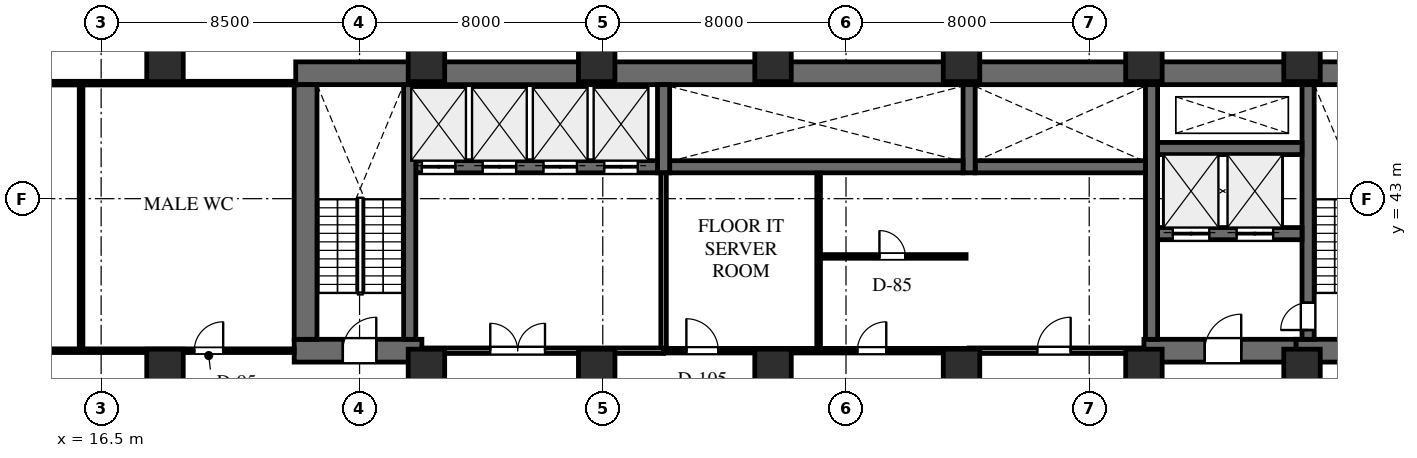
"""IFC4 building model, lengths in metres.
Left out: names, types, materials, properties, quantities, classifications, styles, units other than length and angle.
Written with IfcOpenShell. Run it as: python <this file> out.ifc"""

import sys

from ifc_helpers import new_model, si_unit, direction, frame, frame_2d, origin, origin_2d, place, context, subcontext, project, spatial, rectangle, extrude, element, fill, save


model = new_model("IFC4")
c1 = context("Model", 3, precision=1e-05, world=origin(), true_north=direction((0.0, 1.0)))
c2 = subcontext(c1, "Body", "Model", "MODEL_VIEW")
j1 = project(units=[si_unit("LENGTHUNIT", "METRE"), si_unit("PLANEANGLEUNIT", "RADIAN")], contexts=[c1])
p1 = place(None, origin())
s1 = spatial("IfcSite", under=j1, at=p1, CompositionType="ELEMENT")
p2 = place(p1, origin())
s2 = spatial("IfcBuilding", under=s1, at=p2, CompositionType="ELEMENT")
p3 = place(p2, frame((0.0, 0.0, 53.5)))
s3 = spatial("IfcBuildingStorey", under=s2, at=p3, CompositionType="ELEMENT", Elevation=53.5)
p4 = place(p3, frame((22.9, 47.125, 0.0), z_axis=(0.0, 0.0, 1.0), x_axis=(1.0, 0.0, 0.0)))
e1 = element("IfcWall", 1, at=p4, inside=s3, PredefinedType="SHEAR", context=c2, shape_type="SweptSolid", body=[
    extrude(rectangle(XDim=43.7, YDim=0.75, at=frame_2d((21.85, 0.0))), origin(), (0.0, 0.0, 1.0), 4.0),
])
p5 = place(p3, frame((55.8, 38.0, 0.0), z_axis=(0.0, 0.0, 1.0), x_axis=(1.0, 0.0, 0.0)))
e2 = element("IfcWall", 2, at=p5, inside=s3, PredefinedType="SHEAR", context=c2, shape_type="SweptSolid", body=[
    extrude(rectangle(XDim=10.8, YDim=0.75, at=frame_2d((5.4, 0.0))), origin(), (0.0, 0.0, 1.0), 4.0),
])
p6 = place(p5, frame((1.5, 0.0, 0.0)))
e3 = element("IfcOpeningElement", 3, at=p6, cuts=e2, PredefinedType="OPENING", context=c2, shape_type="SweptSolid", body=[
    extrude(rectangle(XDim=1.1, YDim=2.2, at=frame_2d((0.55, 1.1))), frame((0.0, 0.385, 0.0), z_axis=(0.0, -1.0, 0.0), x_axis=(1.0, 0.0, 0.0)), (0.0, 0.0, 1.0), 0.77),
])
p7 = place(p5, frame((4.82, 0.0, 0.0)))
e4 = element("IfcOpeningElement", 4, at=p7, cuts=e2, PredefinedType="OPENING", context=c2, shape_type="SweptSolid", body=[
    extrude(rectangle(XDim=1.0, YDim=2.15, at=frame_2d((0.5, 1.075))), frame((0.0, 0.385, 0.0), z_axis=(0.0, -1.0, 0.0), x_axis=(1.0, 0.0, 0.0)), (0.0, 0.0, 1.0), 0.77),
])
p8 = place(p5, frame((8.05, 0.0, 0.0)))
e5 = element("IfcOpeningElement", 5, at=p8, cuts=e2, PredefinedType="OPENING", context=c2, shape_type="SweptSolid", body=[
    extrude(rectangle(XDim=1.1, YDim=2.2, at=frame_2d((0.55, 1.1))), frame((0.0, 0.385, 0.0), z_axis=(0.0, -1.0, 0.0), x_axis=(1.0, 0.0, 0.0)), (0.0, 0.0, 1.0), 0.77),
])
p9 = place(p3, frame((56.2, 38.375, 0.0), z_axis=(0.0, 0.0, 1.0), x_axis=(0.0, 1.0, 0.0)))
e6 = element("IfcWall", 6, at=p9, inside=s3, PredefinedType="SHEAR", context=c2, shape_type="SweptSolid", body=[
    extrude(rectangle(XDim=8.375, YDim=0.4, at=frame_2d((4.188, 0.0))), origin(), (0.0, 0.0, 1.0), 4.0),
])
p10 = place(p9, frame((0.305, 0.0, 0.0)))
e7 = element("IfcOpeningElement", 7, at=p10, cuts=e6, PredefinedType="OPENING", context=c2, shape_type="SweptSolid", body=[
    extrude(rectangle(XDim=0.9, YDim=2.15, at=frame_2d((0.45, 1.075))), frame((0.0, 0.21, 0.0), z_axis=(0.0, -1.0, 0.0), x_axis=(1.0, 0.0, 0.0)), (0.0, 0.0, 1.0), 0.42),
])
p11 = place(p3, frame((50.8, 38.0, 0.0), z_axis=(0.0, 0.0, 1.0), x_axis=(1.0, 0.0, 0.0)))
e8 = element("IfcWall", 8, at=p11, inside=s3, PredefinedType="SHEAR", context=c2, shape_type="SweptSolid", body=[
    extrude(rectangle(XDim=5.0, YDim=0.75, at=frame_2d((2.5, 0.0))), origin(), (0.0, 0.0, 1.0), 4.0),
])
p12 = place(p11, frame((2.0, 0.0, 0.0)))
e9 = element("IfcOpeningElement", 9, at=p12, cuts=e8, PredefinedType="OPENING", context=c2, shape_type="SweptSolid", body=[
    extrude(rectangle(XDim=1.2, YDim=2.2, at=frame_2d((0.6, 1.1))), frame((0.0, 0.385, 0.0), z_axis=(0.0, -1.0, 0.0), x_axis=(1.0, 0.0, 0.0)), (0.0, 0.0, 1.0), 0.77),
])
p13 = place(p3, frame((51.25, 41.85, 0.0), z_axis=(0.0, 0.0, 1.0), x_axis=(1.0, 0.0, 0.0)))
e10 = element("IfcWall", 10, at=p13, inside=s3, PredefinedType="SHEAR", context=c2, shape_type="SweptSolid", body=[
    extrude(rectangle(XDim=4.75, YDim=0.4, at=frame_2d((2.375, 0.0))), origin(), (0.0, 0.0, 1.0), 4.0),
])
p14 = place(p13, frame((0.5, 0.0, 0.0)))
e11 = element("IfcOpeningElement", 11, at=p14, cuts=e10, PredefinedType="OPENING", context=c2, shape_type="SweptSolid", body=[
    extrude(rectangle(XDim=1.2, YDim=2.2, at=frame_2d((0.6, 1.1))), frame((0.0, 0.21, 0.0), z_axis=(0.0, -1.0, 0.0), x_axis=(1.0, 0.0, 0.0)), (0.0, 0.0, 1.0), 0.42),
])
p15 = place(p13, frame((2.6, 0.0, 0.0)))
e12 = element("IfcOpeningElement", 12, at=p15, cuts=e10, PredefinedType="OPENING", context=c2, shape_type="SweptSolid", body=[
    extrude(rectangle(XDim=1.2, YDim=2.2, at=frame_2d((0.6, 1.1))), frame((0.0, 0.21, 0.0), z_axis=(0.0, -1.0, 0.0), x_axis=(1.0, 0.0, 0.0)), (0.0, 0.0, 1.0), 0.42),
])
p16 = place(p3, frame((51.25, 44.65, 0.0), z_axis=(0.0, 0.0, 1.0), x_axis=(1.0, 0.0, 0.0)))
e13 = element("IfcWall", 13, at=p16, inside=s3, PredefinedType="SHEAR", context=c2, shape_type="SweptSolid", body=[
    extrude(rectangle(XDim=4.75, YDim=0.4, at=frame_2d((2.375, 0.0))), origin(), (0.0, 0.0, 1.0), 4.0),
])
p17 = place(p3, frame((51.05, 38.375, 0.0), z_axis=(0.0, 0.0, 1.0), x_axis=(0.0, 1.0, 0.0)))
e14 = element("IfcWall", 14, at=p17, inside=s3, PredefinedType="SHEAR", context=c2, shape_type="SweptSolid", body=[
    extrude(rectangle(XDim=8.375, YDim=0.4, at=frame_2d((4.188, 0.0))), origin(), (0.0, 0.0, 1.0), 4.0),
])
p18 = place(p3, frame((45.25, 44.05, 0.0), z_axis=(0.0, 0.0, 1.0), x_axis=(1.0, 0.0, 0.0)))
e15 = element("IfcWall", 15, at=p18, inside=s3, PredefinedType="SHEAR", context=c2, shape_type="SweptSolid", body=[
    extrude(rectangle(XDim=5.6, YDim=0.4, at=frame_2d((2.8, 0.0))), origin(), (0.0, 0.0, 1.0), 4.0),
])
p19 = place(p3, frame((45.05, 43.85, 0.0), z_axis=(0.0, 0.0, 1.0), x_axis=(0.0, 1.0, 0.0)))
e16 = element("IfcWall", 16, at=p19, inside=s3, PredefinedType="SHEAR", context=c2, shape_type="SweptSolid", body=[
    extrude(rectangle(XDim=2.9, YDim=0.4, at=frame_2d((1.45, 0.0))), origin(), (0.0, 0.0, 1.0), 4.0),
])
p20 = place(p3, frame((35.2, 44.05, 0.0), z_axis=(0.0, 0.0, 1.0), x_axis=(1.0, 0.0, 0.0)))
e17 = element("IfcWall", 17, at=p20, inside=s3, PredefinedType="SHEAR", context=c2, shape_type="SweptSolid", body=[
    extrude(rectangle(XDim=9.65, YDim=0.4, at=frame_2d((4.825, 0.0))), origin(), (0.0, 0.0, 1.0), 4.0),
])
p21 = place(p3, frame((35.0, 43.85, 0.0), z_axis=(0.0, 0.0, 1.0), x_axis=(0.0, 1.0, 0.0)))
e18 = element("IfcWall", 18, at=p21, inside=s3, PredefinedType="SHEAR", context=c2, shape_type="SweptSolid", body=[
    extrude(rectangle(XDim=2.9, YDim=0.4, at=frame_2d((1.45, 0.0))), origin(), (0.0, 0.0, 1.0), 4.0),
])
p22 = place(p3, frame((26.85, 44.05, 0.0), z_axis=(0.0, 0.0, 1.0), x_axis=(1.0, 0.0, 0.0)))
e19 = element("IfcWall", 19, at=p22, inside=s3, PredefinedType="SHEAR", context=c2, shape_type="SweptSolid", body=[
    extrude(rectangle(XDim=7.95, YDim=0.4, at=frame_2d((3.975, 0.0))), origin(), (0.0, 0.0, 1.0), 4.0),
])
p23 = place(p22, frame((0.2, 0.0, 0.0)))
e20 = element("IfcOpeningElement", 20, at=p23, cuts=e19, PredefinedType="OPENING", context=c2, shape_type="SweptSolid", body=[
    extrude(rectangle(XDim=1.1, YDim=2.2, at=frame_2d((0.55, 1.1))), frame((0.0, 0.21, 0.0), z_axis=(0.0, -1.0, 0.0), x_axis=(1.0, 0.0, 0.0)), (0.0, 0.0, 1.0), 0.42),
])
p24 = place(p22, frame((2.2, 0.0, 0.0)))
e21 = element("IfcOpeningElement", 21, at=p24, cuts=e19, PredefinedType="OPENING", context=c2, shape_type="SweptSolid", body=[
    extrude(rectangle(XDim=1.1, YDim=2.2, at=frame_2d((0.55, 1.1))), frame((0.0, 0.21, 0.0), z_axis=(0.0, -1.0, 0.0), x_axis=(1.0, 0.0, 0.0)), (0.0, 0.0, 1.0), 0.42),
])
p25 = place(p22, frame((4.2, 0.0, 0.0)))
e22 = element("IfcOpeningElement", 22, at=p25, cuts=e19, PredefinedType="OPENING", context=c2, shape_type="SweptSolid", body=[
    extrude(rectangle(XDim=1.1, YDim=2.2, at=frame_2d((0.55, 1.1))), frame((0.0, 0.21, 0.0), z_axis=(0.0, -1.0, 0.0), x_axis=(1.0, 0.0, 0.0)), (0.0, 0.0, 1.0), 0.42),
])
p26 = place(p22, frame((6.2, 0.0, 0.0)))
e23 = element("IfcOpeningElement", 23, at=p26, cuts=e19, PredefinedType="OPENING", context=c2, shape_type="SweptSolid", body=[
    extrude(rectangle(XDim=1.1, YDim=2.2, at=frame_2d((0.55, 1.1))), frame((0.0, 0.21, 0.0), z_axis=(0.0, -1.0, 0.0), x_axis=(1.0, 0.0, 0.0)), (0.0, 0.0, 1.0), 0.42),
])
p27 = place(p3, frame((22.85, 38.0, 0.0), z_axis=(0.0, 0.0, 1.0), x_axis=(1.0, 0.0, 0.0)))
e24 = element("IfcWall", 24, at=p27, inside=s3, PredefinedType="SHEAR", context=c2, shape_type="SweptSolid", body=[
    extrude(rectangle(XDim=4.2, YDim=0.75, at=frame_2d((2.1, 0.0))), origin(), (0.0, 0.0, 1.0), 4.0),
])
p28 = place(p27, frame((1.6, 0.0, 0.0)))
e25 = element("IfcOpeningElement", 25, at=p28, cuts=e24, PredefinedType="OPENING", context=c2, shape_type="SweptSolid", body=[
    extrude(rectangle(XDim=1.1, YDim=2.2, at=frame_2d((0.55, 1.1))), frame((0.0, 0.385, 0.0), z_axis=(0.0, -1.0, 0.0), x_axis=(1.0, 0.0, 0.0)), (0.0, 0.0, 1.0), 0.77),
])
p29 = place(p3, frame((23.225, 38.375, 0.0), z_axis=(0.0, 0.0, 1.0), x_axis=(0.0, 1.0, 0.0)))
e26 = element("IfcWall", 26, at=p29, inside=s3, PredefinedType="SHEAR", context=c2, shape_type="SweptSolid", body=[
    extrude(rectangle(XDim=8.375, YDim=0.75, at=frame_2d((4.188, 0.0))), origin(), (0.0, 0.0, 1.0), 4.0),
])
p30 = place(p3, frame((26.65, 38.375, 0.0), z_axis=(0.0, 0.0, 1.0), x_axis=(0.0, 1.0, 0.0)))
e27 = element("IfcWall", 27, at=p30, inside=s3, PredefinedType="SHEAR", context=c2, shape_type="SweptSolid", body=[
    extrude(rectangle(XDim=8.375, YDim=0.4, at=frame_2d((4.188, 0.0))), origin(), (0.0, 0.0, 1.0), 4.0),
])
for number, where, z_axis, x_axis in (
    (28, (56.0, 47.55, 0.0), (0.0, 0.0, 1.0), (1.0, 0.0, 0.0)),
    (29, (56.0, 37.35, 0.0), (0.0, 0.0, 1.0), (1.0, 0.0, 0.0)),
    (30, (50.8, 47.55, 0.0), (0.0, 0.0, 1.0), (1.0, 0.0, 0.0)),
    (31, (50.8, 37.35, 0.0), (0.0, 0.0, 1.0), (1.0, 0.0, 0.0)),
    (32, (44.8, 37.35, 0.0), (0.0, 0.0, 1.0), (1.0, 0.0, 0.0)),
    (33, (44.8, 47.55, 0.0), (0.0, 0.0, 1.0), (1.0, 0.0, 0.0)),
    (34, (38.6, 37.35, 0.0), (0.0, 0.0, 1.0), (1.0, 0.0, 0.0)),
    (35, (38.6, 47.55, 0.0), (0.0, 0.0, 1.0), (1.0, 0.0, 0.0)),
    (36, (32.8, 37.35, 0.0), (0.0, 0.0, 1.0), (1.0, 0.0, 0.0)),
    (37, (32.8, 47.55, 0.0), (0.0, 0.0, 1.0), (1.0, 0.0, 0.0)),
    (38, (27.2, 37.35, 0.0), (0.0, 0.0, 1.0), (1.0, 0.0, 0.0)),
    (39, (27.2, 47.55, 0.0), (0.0, 0.0, 1.0), (1.0, 0.0, 0.0)),
    (40, (18.6, 37.35, 0.0), (0.0, 0.0, 1.0), (1.0, 0.0, 0.0)),
    (41, (18.6, 47.55, 0.0), (0.0, 0.0, 1.0), (1.0, 0.0, 0.0)),
):
    element("IfcColumn", number, at=place(p3, frame(where, z_axis=z_axis, x_axis=x_axis)), inside=s3, PredefinedType="COLUMN", context=c2, shape_type="SweptSolid", body=[
        extrude(rectangle(XDim=1.2, YDim=1.4, at=origin_2d()), origin(), (0.0, 0.0, 1.0), 4.0),
    ])
p31 = place(p3, frame((45.05, 38.0, 0.0), z_axis=(0.0, 0.0, 1.0), x_axis=(1.0, 0.0, 0.0)))
e42 = element("IfcWall", 42, at=p31, inside=s3, PredefinedType="STANDARD", context=c2, shape_type="SweptSolid", body=[
    extrude(rectangle(XDim=5.75, YDim=0.18, at=frame_2d((2.875, 0.0))), origin(), (0.0, 0.0, 1.0), 2.813),
])
p32 = place(p31, frame((2.24, 0.0, 0.0)))
e43 = element("IfcOpeningElement", 43, at=p32, cuts=e42, PredefinedType="OPENING", context=c2, shape_type="SweptSolid", body=[
    extrude(rectangle(XDim=1.1, YDim=2.2, at=frame_2d((0.55, 1.1))), frame((0.0, 0.1, 0.0), z_axis=(0.0, -1.0, 0.0), x_axis=(1.0, 0.0, 0.0)), (0.0, 0.0, 1.0), 0.2),
])
p33 = place(p3, frame((35.0, 38.0, 0.0), z_axis=(0.0, 0.0, 1.0), x_axis=(0.0, 1.0, 0.0)))
e44 = element("IfcWall", 44, at=p33, inside=s3, PredefinedType="STANDARD", context=c2, shape_type="SweptSolid", body=[
    extrude(rectangle(XDim=5.85, YDim=0.18, at=frame_2d((2.925, 0.0))), origin(), (0.0, 0.0, 1.0), 3.74),
])
p34 = place(p3, frame((27.05, 38.0, 0.0), z_axis=(0.0, 0.0, 1.0), x_axis=(1.0, 0.0, 0.0)))
e45 = element("IfcWall", 45, at=p34, inside=s3, PredefinedType="STANDARD", context=c2, shape_type="SweptSolid", body=[
    extrude(rectangle(XDim=7.95, YDim=0.18, at=frame_2d((3.975, 0.0))), origin(), (0.0, 0.0, 1.0), 2.813),
])
p35 = place(p34, frame((2.25, 0.0, 0.0)))
e46 = element("IfcOpeningElement", 46, at=p35, cuts=e45, PredefinedType="OPENING", context=c2, shape_type="SweptSolid", body=[
    extrude(rectangle(XDim=1.8, YDim=2.2, at=frame_2d((0.9, 1.1))), frame((0.0, 0.1, 0.0), z_axis=(0.0, -1.0, 0.0), x_axis=(1.0, 0.0, 0.0)), (0.0, 0.0, 1.0), 0.2),
])
p36 = place(p3, frame((35.0, 38.0, 0.0), z_axis=(0.0, 0.0, 1.0), x_axis=(1.0, 0.0, 0.0)))
e47 = element("IfcWall", 47, at=p36, inside=s3, PredefinedType="PARTITIONING", context=c2, shape_type="SweptSolid", body=[
    extrude(rectangle(XDim=10.05, YDim=0.15, at=frame_2d((5.025, 0.0))), origin(), (0.0, 0.0, 1.0), 2.813),
])
p37 = place(p36, frame((0.75, 0.0, 0.0)))
e48 = element("IfcOpeningElement", 48, at=p37, cuts=e47, PredefinedType="OPENING", context=c2, shape_type="SweptSolid", body=[
    extrude(rectangle(XDim=1.05, YDim=2.2, at=frame_2d((0.525, 1.1))), frame((0.0, 0.085, 0.0), z_axis=(0.0, -1.0, 0.0), x_axis=(1.0, 0.0, 0.0)), (0.0, 0.0, 1.0), 0.17),
])
p38 = place(p36, frame((6.375, 0.0, 0.0)))
e49 = element("IfcOpeningElement", 49, at=p38, cuts=e47, PredefinedType="OPENING", context=c2, shape_type="SweptSolid", body=[
    extrude(rectangle(XDim=0.95, YDim=2.15, at=frame_2d((0.475, 1.075))), frame((0.0, 0.085, 0.0), z_axis=(0.0, -1.0, 0.0), x_axis=(1.0, 0.0, 0.0)), (0.0, 0.0, 1.0), 0.17),
])
p39 = place(p3, frame((40.1, 38.068, 0.0), z_axis=(0.0, 0.0, 1.0), x_axis=(0.0, 1.0, 0.0)))
e50 = element("IfcWall", 50, at=p39, inside=s3, PredefinedType="PARTITIONING", context=c2, shape_type="SweptSolid", body=[
    extrude(rectangle(XDim=5.774, YDim=0.12, at=frame_2d((2.887, 0.0))), origin(), (0.0, 0.0, 1.0), 3.74),
])
p40 = place(p3, frame((40.168, 41.1, 0.0), z_axis=(0.0, 0.0, 1.0), x_axis=(1.0, 0.0, 0.0)))
e51 = element("IfcWall", 51, at=p40, inside=s3, PredefinedType="PARTITIONING", context=c2, shape_type="SweptSolid", body=[
    extrude(rectangle(XDim=4.782, YDim=0.12, at=frame_2d((2.391, 0.0))), origin(), (0.0, 0.0, 1.0), 2.813),
])
p41 = place(p40, frame((1.932, 0.0, 0.0)))
e52 = element("IfcOpeningElement", 52, at=p41, cuts=e51, PredefinedType="OPENING", context=c2, shape_type="SweptSolid", body=[
    extrude(rectangle(XDim=0.85, YDim=2.1, at=frame_2d((0.425, 1.05))), frame((0.0, 0.07, 0.0), z_axis=(0.0, -1.0, 0.0), x_axis=(1.0, 0.0, 0.0)), (0.0, 0.0, 1.0), 0.14),
])
p42 = place(p3, frame((6.22, 38.0, 0.0), z_axis=(0.0, 0.0, 1.0), x_axis=(1.0, 0.0, 0.0)))
e53 = element("IfcWall", 53, at=p42, inside=s3, PredefinedType="PARTITIONING", context=c2, shape_type="SweptSolid", body=[
    extrude(rectangle(XDim=16.63, YDim=0.12, at=frame_2d((8.315, 0.0))), origin(), (0.0, 0.0, 1.0), 2.813),
])
p43 = place(p42, frame((0.424, 0.0, 0.0)))
e54 = element("IfcOpeningElement", 54, at=p43, cuts=e53, PredefinedType="OPENING", context=c2, shape_type="SweptSolid", body=[
    extrude(rectangle(XDim=0.95, YDim=2.15, at=frame_2d((0.475, 1.075))), frame((0.0, 0.07, 0.0), z_axis=(0.0, -1.0, 0.0), x_axis=(1.0, 0.0, 0.0)), (0.0, 0.0, 1.0), 0.14),
])
p44 = place(p42, frame((5.444, 0.0, 0.0)))
e55 = element("IfcOpeningElement", 55, at=p44, cuts=e53, PredefinedType="OPENING", context=c2, shape_type="SweptSolid", body=[
    extrude(rectangle(XDim=0.95, YDim=2.15, at=frame_2d((0.475, 1.075))), frame((0.0, 0.07, 0.0), z_axis=(0.0, -1.0, 0.0), x_axis=(1.0, 0.0, 0.0)), (0.0, 0.0, 1.0), 0.14),
])
p45 = place(p42, frame((13.344, 0.0, 0.0)))
e56 = element("IfcOpeningElement", 56, at=p45, cuts=e53, PredefinedType="OPENING", context=c2, shape_type="SweptSolid", body=[
    extrude(rectangle(XDim=0.95, YDim=2.15, at=frame_2d((0.475, 1.075))), frame((0.0, 0.07, 0.0), z_axis=(0.0, -1.0, 0.0), x_axis=(1.0, 0.0, 0.0)), (0.0, 0.0, 1.0), 0.14),
])
p46 = place(p3, frame((6.22, 46.8, 0.0), z_axis=(0.0, 0.0, 1.0), x_axis=(1.0, 0.0, 0.0)))
e57 = element("IfcWall", 57, at=p46, inside=s3, PredefinedType="PARTITIONING", context=c2, shape_type="SweptSolid", body=[
    extrude(rectangle(XDim=16.68, YDim=0.12, at=frame_2d((8.34, 0.0))), origin(), (0.0, 0.0, 1.0), 2.813),
])
p47 = place(p3, frame((15.84, 38.068, 0.0), z_axis=(0.0, 0.0, 1.0), x_axis=(0.0, 1.0, 0.0)))
e58 = element("IfcWall", 58, at=p47, inside=s3, PredefinedType="PARTITIONING", context=c2, shape_type="SweptSolid", body=[
    extrude(rectangle(XDim=8.664, YDim=0.12, at=frame_2d((4.332, 0.0))), origin(), (0.0, 0.0, 1.0), 3.74),
])
p48 = place(p12, origin())
e59 = element("IfcDoor", 59, at=p48, inside=s3, OperationType="SINGLE_SWING_RIGHT", PredefinedType="DOOR", context=c2, shape_type="SweptSolid", body=[
    extrude(rectangle(XDim=1.2, YDim=2.2, at=frame_2d((0.6, 1.1))), frame((0.0, 0.025, 0.0), z_axis=(0.0, -1.0, 0.0), x_axis=(1.0, 0.0, 0.0)), (0.0, 0.0, 1.0), 0.05),
])
fill(e9, e59)
p49 = place(p10, origin())
e60 = element("IfcDoor", 60, at=p49, inside=s3, OperationType="SINGLE_SWING_LEFT", PredefinedType="DOOR", context=c2, shape_type="SweptSolid", body=[
    extrude(rectangle(XDim=0.9, YDim=2.15, at=frame_2d((0.45, 1.075))), frame((0.0, 0.025, 0.0), z_axis=(0.0, -1.0, 0.0), x_axis=(1.0, 0.0, 0.0)), (0.0, 0.0, 1.0), 0.05),
])
fill(e7, e60)
p50 = place(p28, origin())
e61 = element("IfcDoor", 61, at=p50, inside=s3, OperationType="SINGLE_SWING_RIGHT", PredefinedType="DOOR", context=c2, shape_type="SweptSolid", body=[
    extrude(rectangle(XDim=1.1, YDim=2.2, at=frame_2d((0.55, 1.1))), frame((0.0, 0.025, 0.0), z_axis=(0.0, -1.0, 0.0), x_axis=(1.0, 0.0, 0.0)), (0.0, 0.0, 1.0), 0.05),
])
fill(e25, e61)
p51 = place(p23, origin())
e62 = element("IfcDoor", 62, at=p51, inside=s3, OperationType="DOUBLE_DOOR_SLIDING", PredefinedType="DOOR", context=c2, shape_type="SweptSolid", body=[
    extrude(rectangle(XDim=1.1, YDim=2.2, at=frame_2d((0.55, 1.1))), frame((0.0, 0.025, 0.0), z_axis=(0.0, -1.0, 0.0), x_axis=(1.0, 0.0, 0.0)), (0.0, 0.0, 1.0), 0.05),
])
fill(e20, e62)
p52 = place(p24, origin())
e63 = element("IfcDoor", 63, at=p52, inside=s3, OperationType="DOUBLE_DOOR_SLIDING", PredefinedType="DOOR", context=c2, shape_type="SweptSolid", body=[
    extrude(rectangle(XDim=1.1, YDim=2.2, at=frame_2d((0.55, 1.1))), frame((0.0, 0.025, 0.0), z_axis=(0.0, -1.0, 0.0), x_axis=(1.0, 0.0, 0.0)), (0.0, 0.0, 1.0), 0.05),
])
fill(e21, e63)
p53 = place(p25, origin())
e64 = element("IfcDoor", 64, at=p53, inside=s3, OperationType="DOUBLE_DOOR_SLIDING", PredefinedType="DOOR", context=c2, shape_type="SweptSolid", body=[
    extrude(rectangle(XDim=1.1, YDim=2.2, at=frame_2d((0.55, 1.1))), frame((0.0, 0.025, 0.0), z_axis=(0.0, -1.0, 0.0), x_axis=(1.0, 0.0, 0.0)), (0.0, 0.0, 1.0), 0.05),
])
fill(e22, e64)
p54 = place(p26, origin())
e65 = element("IfcDoor", 65, at=p54, inside=s3, OperationType="DOUBLE_DOOR_SLIDING", PredefinedType="DOOR", context=c2, shape_type="SweptSolid", body=[
    extrude(rectangle(XDim=1.1, YDim=2.2, at=frame_2d((0.55, 1.1))), frame((0.0, 0.025, 0.0), z_axis=(0.0, -1.0, 0.0), x_axis=(1.0, 0.0, 0.0)), (0.0, 0.0, 1.0), 0.05),
])
fill(e23, e65)
p55 = place(p14, origin())
e66 = element("IfcDoor", 66, at=p55, inside=s3, OperationType="DOUBLE_DOOR_SLIDING", PredefinedType="DOOR", context=c2, shape_type="SweptSolid", body=[
    extrude(rectangle(XDim=1.2, YDim=2.2, at=frame_2d((0.6, 1.1))), frame((0.0, 0.025, 0.0), z_axis=(0.0, -1.0, 0.0), x_axis=(1.0, 0.0, 0.0)), (0.0, 0.0, 1.0), 0.05),
])
fill(e11, e66)
p56 = place(p15, origin())
e67 = element("IfcDoor", 67, at=p56, inside=s3, OperationType="DOUBLE_DOOR_SLIDING", PredefinedType="DOOR", context=c2, shape_type="SweptSolid", body=[
    extrude(rectangle(XDim=1.2, YDim=2.2, at=frame_2d((0.6, 1.1))), frame((0.0, 0.025, 0.0), z_axis=(0.0, -1.0, 0.0), x_axis=(1.0, 0.0, 0.0)), (0.0, 0.0, 1.0), 0.05),
])
fill(e12, e67)
p57 = place(p32, origin())
e68 = element("IfcDoor", 68, at=p57, inside=s3, OperationType="SINGLE_SWING_RIGHT", PredefinedType="DOOR", context=c2, shape_type="SweptSolid", body=[
    extrude(rectangle(XDim=1.1, YDim=2.2, at=frame_2d((0.55, 1.1))), frame((0.0, 0.025, 0.0), z_axis=(0.0, -1.0, 0.0), x_axis=(1.0, 0.0, 0.0)), (0.0, 0.0, 1.0), 0.05),
])
fill(e43, e68)
p58 = place(p35, origin())
e69 = element("IfcDoor", 69, at=p58, inside=s3, OperationType="DOUBLE_DOOR_SINGLE_SWING", PredefinedType="DOOR", context=c2, shape_type="SweptSolid", body=[
    extrude(rectangle(XDim=1.8, YDim=2.2, at=frame_2d((0.9, 1.1))), frame((0.0, 0.025, 0.0), z_axis=(0.0, -1.0, 0.0), x_axis=(1.0, 0.0, 0.0)), (0.0, 0.0, 1.0), 0.05),
])
fill(e46, e69)
p59 = place(p37, origin())
e70 = element("IfcDoor", 70, at=p59, inside=s3, OperationType="SINGLE_SWING_LEFT", PredefinedType="DOOR", context=c2, shape_type="SweptSolid", body=[
    extrude(rectangle(XDim=1.05, YDim=2.2, at=frame_2d((0.525, 1.1))), frame((0.0, 0.025, 0.0), z_axis=(0.0, -1.0, 0.0), x_axis=(1.0, 0.0, 0.0)), (0.0, 0.0, 1.0), 0.05),
])
fill(e48, e70)
p60 = place(p38, origin())
e71 = element("IfcDoor", 71, at=p60, inside=s3, OperationType="SINGLE_SWING_RIGHT", PredefinedType="DOOR", context=c2, shape_type="SweptSolid", body=[
    extrude(rectangle(XDim=0.95, YDim=2.15, at=frame_2d((0.475, 1.075))), frame((0.0, 0.025, 0.0), z_axis=(0.0, -1.0, 0.0), x_axis=(1.0, 0.0, 0.0)), (0.0, 0.0, 1.0), 0.05),
])
fill(e49, e71)
p61 = place(p41, origin())
e72 = element("IfcDoor", 72, at=p61, inside=s3, OperationType="SINGLE_SWING_LEFT", PredefinedType="DOOR", context=c2, shape_type="SweptSolid", body=[
    extrude(rectangle(XDim=0.85, YDim=2.1, at=frame_2d((0.425, 1.05))), frame((0.0, 0.025, 0.0), z_axis=(0.0, -1.0, 0.0), x_axis=(1.0, 0.0, 0.0)), (0.0, 0.0, 1.0), 0.05),
])
fill(e52, e72)
p62 = place(p45, origin())
e73 = element("IfcDoor", 73, at=p62, inside=s3, OperationType="SINGLE_SWING_RIGHT", PredefinedType="DOOR", context=c2, shape_type="SweptSolid", body=[
    extrude(rectangle(XDim=0.95, YDim=2.15, at=frame_2d((0.475, 1.075))), frame((0.0, 0.025, 0.0), z_axis=(0.0, -1.0, 0.0), x_axis=(1.0, 0.0, 0.0)), (0.0, 0.0, 1.0), 0.05),
])
fill(e56, e73)
save(model, sys.argv[1])
